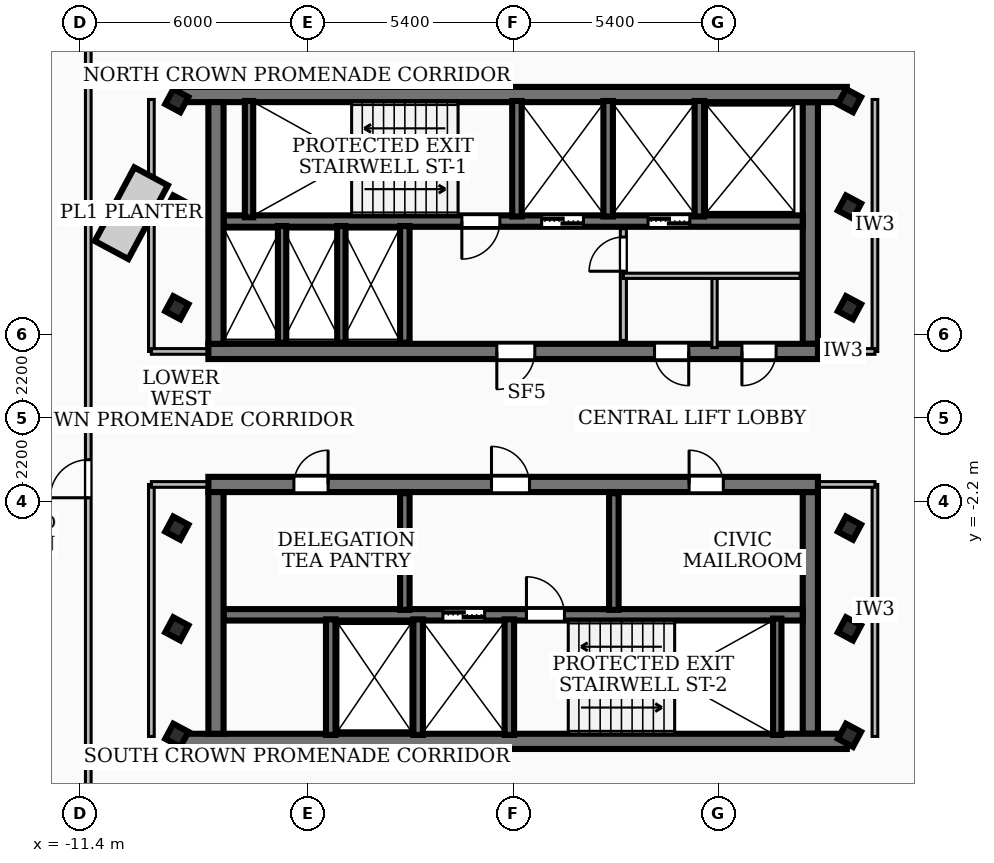
"""IFC4 building model, lengths in metres.
Left out: names, types, materials, properties, quantities, classifications, styles, units other than length and angle.
Written with IfcOpenShell. Run it as: python <this file> out.ifc"""

import sys

from ifc_helpers import new_model, si_unit, direction, frame, frame_2d, origin, origin_2d, place, context, subcontext, project, spatial, rectangle, hollow_rectangle, extrude, element, fill, save


model = new_model("IFC4")
c1 = context("Model", 3, precision=1e-05, world=origin(), true_north=direction((0.0, 1.0)))
c2 = subcontext(c1, "Body", "Model", "MODEL_VIEW")
j1 = project(units=[si_unit("LENGTHUNIT", "METRE"), si_unit("PLANEANGLEUNIT", "RADIAN")], contexts=[c1])
p1 = place(None, origin())
s1 = spatial("IfcSite", under=j1, at=p1, CompositionType="ELEMENT")
p2 = place(p1, origin())
s2 = spatial("IfcBuilding", under=s1, at=p2, CompositionType="ELEMENT")
p3 = place(p2, frame((0.0, 0.0, 285.12)))
s3 = spatial("IfcBuildingStorey", under=s2, at=p3, CompositionType="ELEMENT", Elevation=285.12)
p4 = place(p3, frame((-8.78, 8.51, 0.0), z_axis=(0.0, 0.0, 1.0), x_axis=(1.0, 0.0, 0.0)))
e1 = element("IfcWall", 1, at=p4, inside=s3, PredefinedType="SHEAR", context=c2, shape_type="SweptSolid", body=[
    extrude(rectangle(XDim=17.56, YDim=0.4, at=frame_2d((8.78, 0.0))), origin(), (0.0, 0.0, 1.0), 3.84),
])
p5 = place(p3, frame((8.02, 1.75, 0.0), z_axis=(0.0, 0.0, 1.0), x_axis=(-1.0, 0.0, 0.0)))
e2 = element("IfcWall", 2, at=p5, inside=s3, PredefinedType="SHEAR", context=c2, shape_type="SweptSolid", body=[
    extrude(rectangle(XDim=16.04, YDim=0.4, at=frame_2d((8.02, 0.0))), origin(), (0.0, 0.0, 1.0), 3.84),
])
p6 = place(p5, frame((7.45, 0.0, 0.0)))
e3 = element("IfcOpeningElement", 3, at=p6, cuts=e2, PredefinedType="OPENING", context=c2, shape_type="SweptSolid", body=[
    extrude(rectangle(XDim=1.0, YDim=2.1, at=frame_2d((0.5, 1.05))), frame((0.0, 0.21, 0.0), z_axis=(0.0, -1.0, 0.0), x_axis=(1.0, 0.0, 0.0)), (0.0, 0.0, 1.0), 0.42),
])
p7 = place(p5, frame((3.4, 0.0, 0.0)))
e4 = element("IfcOpeningElement", 4, at=p7, cuts=e2, PredefinedType="OPENING", context=c2, shape_type="SweptSolid", body=[
    extrude(rectangle(XDim=0.9, YDim=2.06, at=frame_2d((0.45, 1.03))), frame((0.0, 0.21, 0.0), z_axis=(0.0, -1.0, 0.0), x_axis=(1.0, 0.0, 0.0)), (0.0, 0.0, 1.0), 0.42),
])
p8 = place(p5, frame((1.1, 0.0, 0.0)))
e5 = element("IfcOpeningElement", 5, at=p8, cuts=e2, PredefinedType="OPENING", context=c2, shape_type="SweptSolid", body=[
    extrude(rectangle(XDim=0.9, YDim=2.06, at=frame_2d((0.45, 1.03))), frame((0.0, 0.21, 0.0), z_axis=(0.0, -1.0, 0.0), x_axis=(1.0, 0.0, 0.0)), (0.0, 0.0, 1.0), 0.42),
])
for number, where, z_axis, x_axis in (
    (6, (-7.82, 1.95, 0.0), (0.0, 0.0, 1.0), (0.0, 1.0, 0.0)),
    (7, (7.82, 8.31, 0.0), (0.0, 0.0, 1.0), (0.0, -1.0, 0.0)),
):
    element("IfcWall", number, at=place(p3, frame(where, z_axis=z_axis, x_axis=x_axis)), inside=s3, PredefinedType="SHEAR", context=c2, shape_type="SweptSolid", body=[
        extrude(rectangle(XDim=6.36, YDim=0.4, at=frame_2d((3.18, 0.0))), origin(), (0.0, 0.0, 1.0), 3.84),
    ])
p9 = place(p3, frame((7.62, 5.18, 0.0), z_axis=(0.0, 0.0, 1.0), x_axis=(-1.0, 0.0, 0.0)))
e8 = element("IfcWall", 8, at=p9, inside=s3, PredefinedType="SOLIDWALL", context=c2, shape_type="SweptSolid", body=[
    extrude(rectangle(XDim=15.24, YDim=0.3, at=frame_2d((7.62, 0.0))), origin(), (0.0, 0.0, 1.0), 3.84),
])
p10 = place(p9, frame((5.77, 0.0, 0.0)))
e9 = element("IfcOpeningElement", 9, at=p10, cuts=e8, PredefinedType="OPENING", context=c2, shape_type="SweptSolid", body=[
    extrude(rectangle(XDim=1.1, YDim=2.15, at=frame_2d((0.55, 1.075))), frame((0.0, 0.16, 0.0), z_axis=(0.0, -1.0, 0.0), x_axis=(1.0, 0.0, 0.0)), (0.0, 0.0, 1.0), 0.32),
])
p11 = place(p9, frame((2.97, 0.0, 0.0)))
e10 = element("IfcOpeningElement", 10, at=p11, cuts=e8, PredefinedType="OPENING", context=c2, shape_type="SweptSolid", body=[
    extrude(rectangle(XDim=1.1, YDim=2.15, at=frame_2d((0.55, 1.075))), frame((0.0, 0.16, 0.0), z_axis=(0.0, -1.0, 0.0), x_axis=(1.0, 0.0, 0.0)), (0.0, 0.0, 1.0), 0.32),
])
p12 = place(p9, frame((7.97, 0.0, 0.0)))
e11 = element("IfcOpeningElement", 11, at=p12, cuts=e8, PredefinedType="OPENING", context=c2, shape_type="SweptSolid", body=[
    extrude(rectangle(XDim=1.0, YDim=2.1, at=frame_2d((0.5, 1.05))), frame((0.0, 0.16, 0.0), z_axis=(0.0, -1.0, 0.0), x_axis=(1.0, 0.0, 0.0)), (0.0, 0.0, 1.0), 0.32),
])
p13 = place(p3, frame((8.78, -8.51, 0.0), z_axis=(0.0, 0.0, 1.0), x_axis=(-1.0, 0.0, 0.0)))
e12 = element("IfcWall", 12, at=p13, inside=s3, PredefinedType="SHEAR", context=c2, shape_type="SweptSolid", body=[
    extrude(rectangle(XDim=17.56, YDim=0.4, at=frame_2d((8.78, 0.0))), origin(), (0.0, 0.0, 1.0), 3.84),
])
p14 = place(p3, frame((-8.02, -1.75, 0.0), z_axis=(0.0, 0.0, 1.0), x_axis=(1.0, 0.0, 0.0)))
e13 = element("IfcWall", 13, at=p14, inside=s3, PredefinedType="SHEAR", context=c2, shape_type="SweptSolid", body=[
    extrude(rectangle(XDim=16.04, YDim=0.4, at=frame_2d((8.02, 0.0))), origin(), (0.0, 0.0, 1.0), 3.84),
])
p15 = place(p14, frame((7.45, 0.0, 0.0)))
e14 = element("IfcOpeningElement", 14, at=p15, cuts=e13, PredefinedType="OPENING", context=c2, shape_type="SweptSolid", body=[
    extrude(rectangle(XDim=1.0, YDim=2.1, at=frame_2d((0.5, 1.05))), frame((0.0, 0.21, 0.0), z_axis=(0.0, -1.0, 0.0), x_axis=(1.0, 0.0, 0.0)), (0.0, 0.0, 1.0), 0.42),
])
p16 = place(p14, frame((12.65, 0.0, 0.0)))
e15 = element("IfcOpeningElement", 15, at=p16, cuts=e13, PredefinedType="OPENING", context=c2, shape_type="SweptSolid", body=[
    extrude(rectangle(XDim=0.9, YDim=2.06, at=frame_2d((0.45, 1.03))), frame((0.0, 0.21, 0.0), z_axis=(0.0, -1.0, 0.0), x_axis=(1.0, 0.0, 0.0)), (0.0, 0.0, 1.0), 0.42),
])
p17 = place(p14, frame((2.25, 0.0, 0.0)))
e16 = element("IfcOpeningElement", 16, at=p17, cuts=e13, PredefinedType="OPENING", context=c2, shape_type="SweptSolid", body=[
    extrude(rectangle(XDim=0.9, YDim=2.06, at=frame_2d((0.45, 1.03))), frame((0.0, 0.21, 0.0), z_axis=(0.0, -1.0, 0.0), x_axis=(1.0, 0.0, 0.0)), (0.0, 0.0, 1.0), 0.42),
])
for number, where, z_axis, x_axis in (
    (17, (-7.82, -8.31, 0.0), (0.0, 0.0, 1.0), (0.0, 1.0, 0.0)),
    (18, (7.82, -1.95, 0.0), (0.0, 0.0, 1.0), (0.0, -1.0, 0.0)),
):
    element("IfcWall", number, at=place(p3, frame(where, z_axis=z_axis, x_axis=x_axis)), inside=s3, PredefinedType="SHEAR", context=c2, shape_type="SweptSolid", body=[
        extrude(rectangle(XDim=6.36, YDim=0.4, at=frame_2d((3.18, 0.0))), origin(), (0.0, 0.0, 1.0), 3.84),
    ])
p18 = place(p3, frame((-7.62, -5.18, 0.0), z_axis=(0.0, 0.0, 1.0), x_axis=(1.0, 0.0, 0.0)))
e19 = element("IfcWall", 19, at=p18, inside=s3, PredefinedType="SOLIDWALL", context=c2, shape_type="SweptSolid", body=[
    extrude(rectangle(XDim=15.24, YDim=0.3, at=frame_2d((7.62, 0.0))), origin(), (0.0, 0.0, 1.0), 3.84),
])
p19 = place(p18, frame((5.77, 0.0, 0.0)))
e20 = element("IfcOpeningElement", 20, at=p19, cuts=e19, PredefinedType="OPENING", context=c2, shape_type="SweptSolid", body=[
    extrude(rectangle(XDim=1.1, YDim=2.15, at=frame_2d((0.55, 1.075))), frame((0.0, 0.16, 0.0), z_axis=(0.0, -1.0, 0.0), x_axis=(1.0, 0.0, 0.0)), (0.0, 0.0, 1.0), 0.32),
])
p20 = place(p18, frame((7.97, 0.0, 0.0)))
e21 = element("IfcOpeningElement", 21, at=p20, cuts=e19, PredefinedType="OPENING", context=c2, shape_type="SweptSolid", body=[
    extrude(rectangle(XDim=1.0, YDim=2.1, at=frame_2d((0.5, 1.05))), frame((0.0, 0.16, 0.0), z_axis=(0.0, -1.0, 0.0), x_axis=(1.0, 0.0, 0.0)), (0.0, 0.0, 1.0), 0.32),
])
for number, where, z_axis, x_axis in (
    (22, (-6.95, 5.28, 0.0), (0.0, 0.0, 1.0), (0.0, 1.0, 0.0)),
    (23, (6.95, -8.34, 0.0), (0.0, 0.0, 1.0), (0.0, 1.0, 0.0)),
):
    element("IfcWall", number, at=place(p3, frame(where, z_axis=z_axis, x_axis=x_axis)), inside=s3, PredefinedType="SOLIDWALL", context=c2, shape_type="SweptSolid", body=[
        extrude(rectangle(XDim=3.06, YDim=0.22, at=frame_2d((1.53, 0.0))), origin(), (0.0, 0.0, 1.0), 3.84),
    ])
for number, where, z_axis, x_axis in (
    (24, (0.1, 5.3, 0.0), (0.0, 0.0, 1.0), (0.0, 1.0, 0.0)),
    (25, (2.5, 5.3, 0.0), (0.0, 0.0, 1.0), (0.0, 1.0, 0.0)),
    (26, (4.9, 5.3, 0.0), (0.0, 0.0, 1.0), (0.0, 1.0, 0.0)),
):
    element("IfcWall", number, at=place(p3, frame(where, z_axis=z_axis, x_axis=x_axis)), inside=s3, PredefinedType="SOLIDWALL", context=c2, shape_type="SweptSolid", body=[
        extrude(rectangle(XDim=3.04, YDim=0.25, at=frame_2d((1.52, 0.0))), origin(), (0.0, 0.0, 1.0), 3.84),
    ])
p21 = place(p3, frame((-2.85, 1.98, 0.0), z_axis=(0.0, 0.0, 1.0), x_axis=(0.0, 1.0, 0.0)))
e27 = element("IfcWall", 27, at=p21, inside=s3, PredefinedType="SOLIDWALL", context=c2, shape_type="SweptSolid", body=[
    extrude(rectangle(XDim=3.07, YDim=0.25, at=frame_2d((1.535, 0.0))), origin(), (0.0, 0.0, 1.0), 3.84),
])
for number, where, z_axis, x_axis in (
    (28, (-0.1, -8.34, 0.0), (0.0, 0.0, 1.0), (0.0, 1.0, 0.0)),
    (29, (-2.5, -8.34, 0.0), (0.0, 0.0, 1.0), (0.0, 1.0, 0.0)),
    (30, (-4.8, -8.34, 0.0), (0.0, 0.0, 1.0), (0.0, 1.0, 0.0)),
):
    element("IfcWall", number, at=place(p3, frame(where, z_axis=z_axis, x_axis=x_axis)), inside=s3, PredefinedType="SOLIDWALL", context=c2, shape_type="SweptSolid", body=[
        extrude(rectangle(XDim=3.04, YDim=0.25, at=frame_2d((1.52, 0.0))), origin(), (0.0, 0.0, 1.0), 3.84),
    ])
for number, where, z_axis, x_axis in (
    (31, (-2.85, -5.05, 0.0), (0.0, 0.0, 1.0), (0.0, 1.0, 0.0)),
    (32, (2.65, -5.05, 0.0), (0.0, 0.0, 1.0), (0.0, 1.0, 0.0)),
):
    element("IfcWall", number, at=place(p3, frame(where, z_axis=z_axis, x_axis=x_axis)), inside=s3, PredefinedType="SOLIDWALL", context=c2, shape_type="SweptSolid", body=[
        extrude(rectangle(XDim=3.07, YDim=0.25, at=frame_2d((1.535, 0.0))), origin(), (0.0, 0.0, 1.0), 3.84),
    ])
for number, where, z_axis, x_axis in (
    (33, (-6.08, 1.98, 0.0), (0.0, 0.0, 1.0), (0.0, 1.0, 0.0)),
    (34, (-4.52, 1.98, 0.0), (0.0, 0.0, 1.0), (0.0, 1.0, 0.0)),
):
    element("IfcWall", number, at=place(p3, frame(where, z_axis=z_axis, x_axis=x_axis)), inside=s3, PredefinedType="SOLIDWALL", context=c2, shape_type="SweptSolid", body=[
        extrude(rectangle(XDim=3.07, YDim=0.22, at=frame_2d((1.535, 0.0))), origin(), (0.0, 0.0, 1.0), 3.84),
    ])
for number, where, z_axis, x_axis in (
    (35, (-8.85, -5.55, 0.0), (0.0, 0.0, 1.0), (0.473, 0.881, 0.0)),
    (36, (-8.85, -2.9, 0.0), (0.0, 0.0, 1.0), (0.473, 0.881, 0.0)),
    (37, (-8.85, 2.9, 0.0), (0.0, 0.0, 1.0), (0.473, 0.881, 0.0)),
    (38, (-8.85, 5.55, 0.0), (0.0, 0.0, 1.0), (0.473, 0.881, 0.0)),
    (39, (8.85, -5.55, 0.0), (0.0, 0.0, 1.0), (0.473, 0.881, 0.0)),
    (40, (8.85, -2.9, 0.0), (0.0, 0.0, 1.0), (0.473, 0.881, 0.0)),
    (41, (8.85, 2.9, 0.0), (0.0, 0.0, 1.0), (0.473, 0.881, 0.0)),
    (42, (8.85, 5.55, 0.0), (0.0, 0.0, 1.0), (0.473, 0.881, 0.0)),
    (43, (-8.85, 8.35, 0.0), (0.0, 0.0, 1.0), (0.473, 0.881, 0.0)),
    (44, (8.85, -8.35, 0.0), (0.0, 0.0, 1.0), (0.473, 0.881, 0.0)),
    (45, (8.85, 8.35, 0.0), (0.0, 0.0, 1.0), (0.473, 0.881, 0.0)),
    (46, (-8.85, -8.35, 0.0), (0.0, 0.0, 1.0), (0.473, 0.881, 0.0)),
):
    element("IfcColumn", number, at=place(p3, frame(where, z_axis=z_axis, x_axis=x_axis)), inside=s3, PredefinedType="COLUMN", context=c2, shape_type="SweptSolid", body=[
        extrude(hollow_rectangle(XDim=0.45, YDim=0.45, WallThickness=0.022, at=origin_2d()), origin(), (0.0, 0.0, 1.0), 4.14),
    ])
p22 = place(p3, frame((2.9, 2.04, 0.0), z_axis=(0.0, 0.0, 1.0), x_axis=(0.0, 1.0, 0.0)))
e47 = element("IfcWall", 47, at=p22, inside=s3, PredefinedType="PARTITIONING", context=c2, shape_type="SweptSolid", body=[
    extrude(rectangle(XDim=2.94, YDim=0.16, at=frame_2d((1.47, 0.0))), origin(), (0.0, 0.0, 1.0), 3.07),
])
p23 = place(p22, frame((1.82, 0.0, 0.0)))
e48 = element("IfcOpeningElement", 48, at=p23, cuts=e47, PredefinedType="OPENING", context=c2, shape_type="SweptSolid", body=[
    extrude(rectangle(XDim=0.9, YDim=2.06, at=frame_2d((0.45, 1.03))), frame((0.0, 0.09, 0.0), z_axis=(0.0, -1.0, 0.0), x_axis=(1.0, 0.0, 0.0)), (0.0, 0.0, 1.0), 0.18),
])
p24 = place(p3, frame((2.9, 3.74, 0.0), z_axis=(0.0, 0.0, 1.0), x_axis=(1.0, 0.0, 0.0)))
e49 = element("IfcWall", 49, at=p24, inside=s3, PredefinedType="PARTITIONING", context=c2, shape_type="SweptSolid", body=[
    extrude(rectangle(XDim=4.65, YDim=0.138, at=frame_2d((2.325, 0.0))), origin(), (0.0, 0.0, 1.0), 3.84),
])
p25 = place(p3, frame((5.3, 1.85, 0.0), z_axis=(0.0, 0.0, 1.0), x_axis=(0.0, 1.0, 0.0)))
e50 = element("IfcWall", 50, at=p25, inside=s3, PredefinedType="PARTITIONING", context=c2, shape_type="SweptSolid", body=[
    extrude(rectangle(XDim=1.89, YDim=0.138, at=frame_2d((0.945, 0.0))), origin(), (0.0, 0.0, 1.0), 3.07),
])
p26 = place(p3, frame((-9.52, 1.75, 0.0), z_axis=(0.0, 0.0, 1.0), x_axis=(0.0, 1.0, 0.0)))
e51 = element("IfcWall", 51, at=p26, inside=s3, PredefinedType="PARTITIONING", context=c2, shape_type="SweptSolid", body=[
    extrude(rectangle(XDim=6.63, YDim=0.15, at=frame_2d((3.315, 0.0))), origin(), (0.0, 0.0, 1.0), 3.21),
])
p27 = place(p3, frame((-7.85, 1.75, 0.0), z_axis=(0.0, 0.0, 1.0), x_axis=(-1.0, 0.0, 0.0)))
e52 = element("IfcWall", 52, at=p27, inside=s3, PredefinedType="PARTITIONING", context=c2, shape_type="SweptSolid", body=[
    extrude(rectangle(XDim=1.67, YDim=0.15, at=frame_2d((0.835, 0.0))), origin(), (0.0, 0.0, 1.0), 3.07),
])
p28 = place(p3, frame((-9.52, -8.38, 0.0), z_axis=(0.0, 0.0, 1.0), x_axis=(0.0, 1.0, 0.0)))
e53 = element("IfcWall", 53, at=p28, inside=s3, PredefinedType="PARTITIONING", context=c2, shape_type="SweptSolid", body=[
    extrude(rectangle(XDim=6.63, YDim=0.15, at=frame_2d((3.315, 0.0))), origin(), (0.0, 0.0, 1.0), 3.84),
])
p29 = place(p3, frame((-7.85, -1.75, 0.0), z_axis=(0.0, 0.0, 1.0), x_axis=(-1.0, 0.0, 0.0)))
e54 = element("IfcWall", 54, at=p29, inside=s3, PredefinedType="PARTITIONING", context=c2, shape_type="SweptSolid", body=[
    extrude(rectangle(XDim=1.67, YDim=0.15, at=frame_2d((0.835, 0.0))), origin(), (0.0, 0.0, 1.0), 3.07),
])
p30 = place(p3, frame((9.52, 1.75, 0.0), z_axis=(0.0, 0.0, 1.0), x_axis=(0.0, 1.0, 0.0)))
e55 = element("IfcWall", 55, at=p30, inside=s3, PredefinedType="PARTITIONING", context=c2, shape_type="SweptSolid", body=[
    extrude(rectangle(XDim=6.63, YDim=0.15, at=frame_2d((3.315, 0.0))), origin(), (0.0, 0.0, 1.0), 3.84),
])
p31 = place(p3, frame((7.85, 1.75, 0.0), z_axis=(0.0, 0.0, 1.0), x_axis=(1.0, 0.0, 0.0)))
e56 = element("IfcWall", 56, at=p31, inside=s3, PredefinedType="PARTITIONING", context=c2, shape_type="SweptSolid", body=[
    extrude(rectangle(XDim=1.67, YDim=0.15, at=frame_2d((0.835, 0.0))), origin(), (0.0, 0.0, 1.0), 3.07),
])
p32 = place(p3, frame((9.52, -8.38, 0.0), z_axis=(0.0, 0.0, 1.0), x_axis=(0.0, 1.0, 0.0)))
e57 = element("IfcWall", 57, at=p32, inside=s3, PredefinedType="PARTITIONING", context=c2, shape_type="SweptSolid", body=[
    extrude(rectangle(XDim=6.63, YDim=0.15, at=frame_2d((3.315, 0.0))), origin(), (0.0, 0.0, 1.0), 3.21),
])
p33 = place(p3, frame((7.85, -1.75, 0.0), z_axis=(0.0, 0.0, 1.0), x_axis=(1.0, 0.0, 0.0)))
e58 = element("IfcWall", 58, at=p33, inside=s3, PredefinedType="PARTITIONING", context=c2, shape_type="SweptSolid", body=[
    extrude(rectangle(XDim=1.67, YDim=0.15, at=frame_2d((0.835, 0.0))), origin(), (0.0, 0.0, 1.0), 3.07),
])
p34 = place(p3, frame((-11.18, -11.928, 0.0), z_axis=(0.0, 0.0, 1.0), x_axis=(0.0, 1.0, 0.0)))
e59 = element("IfcWall", 59, at=p34, inside=s3, PredefinedType="PARTITIONING", context=c2, shape_type="SweptSolid", body=[
    extrude(rectangle(XDim=24.095, YDim=0.15, at=frame_2d((12.047, 0.0))), origin(), (0.0, 0.0, 1.0), 3.84),
])
p35 = place(p34, frame((9.828, 0.0, 0.0)))
e60 = element("IfcOpeningElement", 60, at=p35, cuts=e59, PredefinedType="OPENING", context=c2, shape_type="SweptSolid", body=[
    extrude(rectangle(XDim=1.0, YDim=2.1, at=frame_2d((0.5, 1.05))), frame((0.0, 0.085, 0.0), z_axis=(0.0, -1.0, 0.0), x_axis=(1.0, 0.0, 0.0)), (0.0, 0.0, 1.0), 0.17),
])
p36 = place(p6, origin())
e61 = element("IfcDoor", 61, at=p36, inside=s3, OperationType="SINGLE_SWING_RIGHT", PredefinedType="DOOR", context=c2, shape_type="SweptSolid", body=[
    extrude(rectangle(XDim=1.0, YDim=2.1, at=frame_2d((0.5, 1.05))), frame((0.0, 0.025, 0.0), z_axis=(0.0, -1.0, 0.0), x_axis=(1.0, 0.0, 0.0)), (0.0, 0.0, 1.0), 0.05),
])
fill(e3, e61)
p37 = place(p15, origin())
e62 = element("IfcDoor", 62, at=p37, inside=s3, OperationType="SINGLE_SWING_LEFT", PredefinedType="DOOR", context=c2, shape_type="SweptSolid", body=[
    extrude(rectangle(XDim=1.0, YDim=2.1, at=frame_2d((0.5, 1.05))), frame((0.0, 0.025, 0.0), z_axis=(0.0, -1.0, 0.0), x_axis=(1.0, 0.0, 0.0)), (0.0, 0.0, 1.0), 0.05),
])
fill(e14, e62)
p38 = place(p10, origin())
e63 = element("IfcDoor", 63, at=p38, inside=s3, OperationType="DOUBLE_DOOR_SLIDING", PredefinedType="DOOR", context=c2, shape_type="SweptSolid", body=[
    extrude(rectangle(XDim=1.1, YDim=2.15, at=frame_2d((0.55, 1.075))), frame((0.0, 0.025, 0.0), z_axis=(0.0, -1.0, 0.0), x_axis=(1.0, 0.0, 0.0)), (0.0, 0.0, 1.0), 0.05),
])
fill(e9, e63)
p39 = place(p11, origin())
e64 = element("IfcDoor", 64, at=p39, inside=s3, OperationType="DOUBLE_DOOR_SLIDING", PredefinedType="DOOR", context=c2, shape_type="SweptSolid", body=[
    extrude(rectangle(XDim=1.1, YDim=2.15, at=frame_2d((0.55, 1.075))), frame((0.0, 0.025, 0.0), z_axis=(0.0, -1.0, 0.0), x_axis=(1.0, 0.0, 0.0)), (0.0, 0.0, 1.0), 0.05),
])
fill(e10, e64)
p40 = place(p12, origin())
e65 = element("IfcDoor", 65, at=p40, inside=s3, OperationType="SINGLE_SWING_RIGHT", PredefinedType="DOOR", context=c2, shape_type="SweptSolid", body=[
    extrude(rectangle(XDim=1.0, YDim=2.1, at=frame_2d((0.5, 1.05))), frame((0.0, 0.025, 0.0), z_axis=(0.0, -1.0, 0.0), x_axis=(1.0, 0.0, 0.0)), (0.0, 0.0, 1.0), 0.05),
])
fill(e11, e65)
p41 = place(p19, origin())
e66 = element("IfcDoor", 66, at=p41, inside=s3, OperationType="DOUBLE_DOOR_SLIDING", PredefinedType="DOOR", context=c2, shape_type="SweptSolid", body=[
    extrude(rectangle(XDim=1.1, YDim=2.15, at=frame_2d((0.55, 1.075))), frame((0.0, 0.025, 0.0), z_axis=(0.0, -1.0, 0.0), x_axis=(1.0, 0.0, 0.0)), (0.0, 0.0, 1.0), 0.05),
])
fill(e20, e66)
p42 = place(p20, origin())
e67 = element("IfcDoor", 67, at=p42, inside=s3, OperationType="SINGLE_SWING_LEFT", PredefinedType="DOOR", context=c2, shape_type="SweptSolid", body=[
    extrude(rectangle(XDim=1.0, YDim=2.1, at=frame_2d((0.5, 1.05))), frame((0.0, 0.025, 0.0), z_axis=(0.0, -1.0, 0.0), x_axis=(1.0, 0.0, 0.0)), (0.0, 0.0, 1.0), 0.05),
])
fill(e21, e67)
p43 = place(p16, origin())
e68 = element("IfcDoor", 68, at=p43, inside=s3, OperationType="SINGLE_SWING_LEFT", PredefinedType="DOOR", context=c2, shape_type="SweptSolid", body=[
    extrude(rectangle(XDim=0.9, YDim=2.06, at=frame_2d((0.45, 1.03))), frame((0.0, 0.025, 0.0), z_axis=(0.0, -1.0, 0.0), x_axis=(1.0, 0.0, 0.0)), (0.0, 0.0, 1.0), 0.05),
])
fill(e15, e68)
p44 = place(p17, origin())
e69 = element("IfcDoor", 69, at=p44, inside=s3, OperationType="SINGLE_SWING_RIGHT", PredefinedType="DOOR", context=c2, shape_type="SweptSolid", body=[
    extrude(rectangle(XDim=0.9, YDim=2.06, at=frame_2d((0.45, 1.03))), frame((0.0, 0.025, 0.0), z_axis=(0.0, -1.0, 0.0), x_axis=(1.0, 0.0, 0.0)), (0.0, 0.0, 1.0), 0.05),
])
fill(e16, e69)
p45 = place(p7, origin())
e70 = element("IfcDoor", 70, at=p45, inside=s3, OperationType="SINGLE_SWING_LEFT", PredefinedType="DOOR", context=c2, shape_type="SweptSolid", body=[
    extrude(rectangle(XDim=0.9, YDim=2.06, at=frame_2d((0.45, 1.03))), frame((0.0, 0.025, 0.0), z_axis=(0.0, -1.0, 0.0), x_axis=(1.0, 0.0, 0.0)), (0.0, 0.0, 1.0), 0.05),
])
fill(e4, e70)
p46 = place(p8, origin())
e71 = element("IfcDoor", 71, at=p46, inside=s3, OperationType="SINGLE_SWING_RIGHT", PredefinedType="DOOR", context=c2, shape_type="SweptSolid", body=[
    extrude(rectangle(XDim=0.9, YDim=2.06, at=frame_2d((0.45, 1.03))), frame((0.0, 0.025, 0.0), z_axis=(0.0, -1.0, 0.0), x_axis=(1.0, 0.0, 0.0)), (0.0, 0.0, 1.0), 0.05),
])
fill(e5, e71)
p47 = place(p23, origin())
e72 = element("IfcDoor", 72, at=p47, inside=s3, OperationType="SINGLE_SWING_LEFT", PredefinedType="DOOR", context=c2, shape_type="SweptSolid", body=[
    extrude(rectangle(XDim=0.9, YDim=2.06, at=frame_2d((0.45, 1.03))), frame((0.0, 0.025, 0.0), z_axis=(0.0, -1.0, 0.0), x_axis=(1.0, 0.0, 0.0)), (0.0, 0.0, 1.0), 0.05),
])
fill(e48, e72)
p48 = place(p35, origin())
e73 = element("IfcDoor", 73, at=p48, inside=s3, OperationType="SINGLE_SWING_LEFT", PredefinedType="DOOR", context=c2, shape_type="SweptSolid", body=[
    extrude(rectangle(XDim=1.0, YDim=2.1, at=frame_2d((0.5, 1.05))), frame((0.0, 0.025, 0.0), z_axis=(0.0, -1.0, 0.0), x_axis=(1.0, 0.0, 0.0)), (0.0, 0.0, 1.0), 0.05),
])
fill(e60, e73)
save(model, sys.argv[1])
